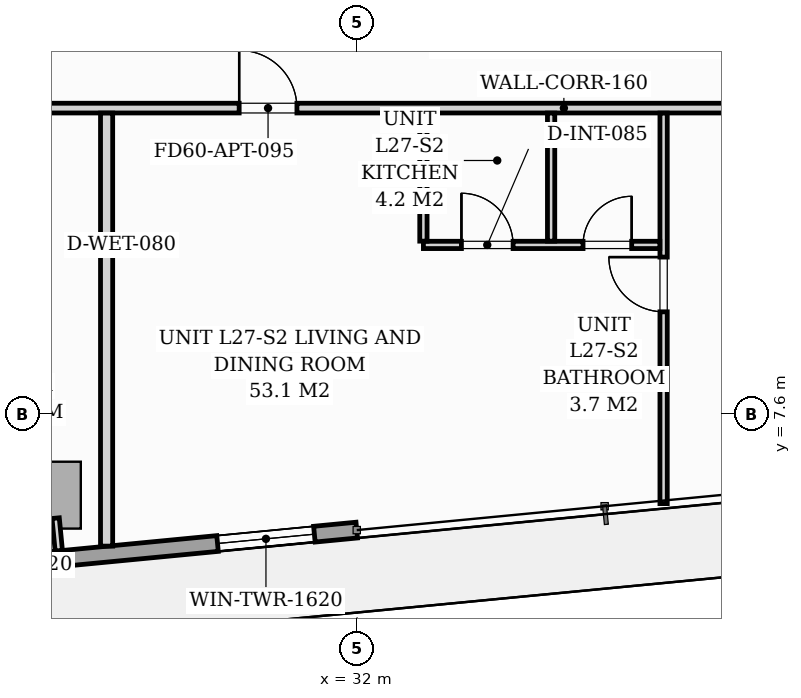
"""IFC4 building model, lengths in metres.
Left out: names, types, materials, properties, quantities, classifications, styles, units other than length and angle.
Written with IfcOpenShell. Run it as: python <this file> out.ifc"""

import sys

from ifc_helpers import new_model, si_unit, direction, frame, frame_2d, origin, origin_2d, place, context, subcontext, project, spatial, rectangle, extrude, source, transform, mapped, element, fill, save


model = new_model("IFC4")
c1 = context("Model", 3, precision=1e-05, world=origin(), true_north=direction((0.0, 1.0)))
c2 = subcontext(c1, "Body", "Model", "MODEL_VIEW")
j1 = project(units=[si_unit("LENGTHUNIT", "METRE"), si_unit("PLANEANGLEUNIT", "RADIAN")], contexts=[c1])
p1 = place(None, origin())
s1 = spatial("IfcSite", under=j1, at=p1, CompositionType="ELEMENT")
p2 = place(p1, origin())
s2 = spatial("IfcBuilding", under=s1, at=p2, CompositionType="ELEMENT")
p3 = place(p2, frame((0.0, 0.0, 97.0)))
s3 = spatial("IfcBuildingStorey", under=s2, at=p3, CompositionType="ELEMENT", Elevation=97.0)
m1 = source(origin(), c2, "Body", "SweptSolid", [
    extrude(rectangle(XDim=0.9, YDim=1.1, at=origin_2d()), origin(), (0.0, 0.0, 1.0), 3.196),
])
p4 = place(p3, frame((27.006, 6.265, 0.002), z_axis=(0.0, 0.0, 1.0), x_axis=(0.995396198367, 0.09584575252, 0.0)))
e1 = element("IfcColumn", 1, at=p4, inside=s3, PredefinedType="COLUMN", context=c2, shape_type="MappedRepresentation", body=[
    mapped(m1, transform((0.0, 0.0, 0.0), scale=1.0)),
])
p5 = place(p3, frame((31.994, 5.69, 0.0), z_axis=(0.0, 0.0, 1.0), x_axis=(-0.995396521236, -0.095842399342, 0.0)))
e2 = element("IfcWall", 2, at=p5, inside=s3, PredefinedType="STANDARD", context=c2, shape_type="SweptSolid", body=[
    extrude(rectangle(XDim=19.11, YDim=0.26, at=frame_2d((9.555, 0.0))), origin(), (0.0, 0.0, 1.0), 2.94),
])
p6 = place(p5, frame((7.91, 0.0, 0.0)))
e3 = element("IfcOpeningElement", 3, at=p6, cuts=e2, PredefinedType="OPENING", context=c2, shape_type="SweptSolid", body=[
    extrude(rectangle(XDim=1.8, YDim=2.06, at=frame_2d((0.9, 1.03))), frame((0.0, 0.14, 0.0), z_axis=(0.0, -1.0, 0.0), x_axis=(1.0, 0.0, 0.0)), (0.0, 0.0, 1.0), 0.28),
])
p7 = place(p5, frame((0.7, 0.0, 0.65)))
e4 = element("IfcOpeningElement", 4, at=p7, cuts=e2, PredefinedType="OPENING", context=c2, shape_type="SweptSolid", body=[
    extrude(rectangle(XDim=1.6, YDim=1.5, at=frame_2d((0.8, 0.75))), frame((0.0, 0.14, 0.0), z_axis=(0.0, -1.0, 0.0), x_axis=(1.0, 0.0, 0.0)), (0.0, 0.0, 1.0), 0.28),
])
p8 = place(p5, frame((5.167, 0.0, 0.75)))
e5 = element("IfcOpeningElement", 5, at=p8, cuts=e2, PredefinedType="OPENING", context=c2, shape_type="SweptSolid", body=[
    extrude(rectangle(XDim=1.6, YDim=1.5, at=frame_2d((0.8, 0.75))), frame((0.0, 0.14, 0.0), z_axis=(0.0, -1.0, 0.0), x_axis=(1.0, 0.0, 0.0)), (0.0, 0.0, 1.0), 0.28),
])
p9 = place(p3, frame((16.6, 12.63, 0.0), z_axis=(0.0, 0.0, 1.0), x_axis=(1.0, 0.0, 0.0)))
e6 = element("IfcWall", 6, at=p9, inside=s3, PredefinedType="PARTITIONING", context=c2, shape_type="SweptSolid", body=[
    extrude(rectangle(XDim=37.6, YDim=0.16, at=frame_2d((18.8, 0.0))), origin(), (0.0, 0.0, 1.0), 2.94),
])
p10 = place(p9, frame((1.626, 0.0, 0.0)))
e7 = element("IfcOpeningElement", 7, at=p10, cuts=e6, PredefinedType="OPENING", context=c2, shape_type="SweptSolid", body=[
    extrude(rectangle(XDim=0.95, YDim=2.06, at=frame_2d((0.475, 1.03))), frame((0.0, 0.09, 0.0), z_axis=(0.0, -1.0, 0.0), x_axis=(1.0, 0.0, 0.0)), (0.0, 0.0, 1.0), 0.18),
])
p11 = place(p9, frame((13.46, 0.0, 0.0)))
e8 = element("IfcOpeningElement", 8, at=p11, cuts=e6, PredefinedType="OPENING", context=c2, shape_type="SweptSolid", body=[
    extrude(rectangle(XDim=0.95, YDim=2.06, at=frame_2d((0.475, 1.03))), frame((0.0, 0.09, 0.0), z_axis=(0.0, -1.0, 0.0), x_axis=(1.0, 0.0, 0.0)), (0.0, 0.0, 1.0), 0.18),
])
p12 = place(p9, frame((26.522, 0.0, 0.0)))
e9 = element("IfcOpeningElement", 9, at=p12, cuts=e6, PredefinedType="OPENING", context=c2, shape_type="SweptSolid", body=[
    extrude(rectangle(XDim=0.95, YDim=2.06, at=frame_2d((0.475, 1.03))), frame((0.0, 0.09, 0.0), z_axis=(0.0, -1.0, 0.0), x_axis=(1.0, 0.0, 0.0)), (0.0, 0.0, 1.0), 0.18),
])
p13 = place(p3, frame((27.88, 5.427, 0.0), z_axis=(0.0, 0.0, 1.0), x_axis=(0.0, 1.0, 0.0)))
e10 = element("IfcWall", 10, at=p13, inside=s3, PredefinedType="PARTITIONING", context=c2, shape_type="SweptSolid", body=[
    extrude(rectangle(XDim=7.121, YDim=0.2, at=frame_2d((3.561, 0.0))), origin(), (0.0, 0.0, 1.0), 2.94),
])
p14 = place(p3, frame((37.04, 6.126, 0.0), z_axis=(0.0, 0.0, 1.0), x_axis=(0.0, 1.0, 0.0)))
e11 = element("IfcWall", 11, at=p14, inside=s3, PredefinedType="PARTITIONING", context=c2, shape_type="SweptSolid", body=[
    extrude(rectangle(XDim=6.422, YDim=0.12, at=frame_2d((3.211, 0.0))), origin(), (0.0, 0.0, 1.0), 2.94),
])
p15 = place(p14, frame((3.154, 0.0, 0.0)))
e12 = element("IfcOpeningElement", 12, at=p15, cuts=e11, PredefinedType="OPENING", context=c2, shape_type="SweptSolid", body=[
    extrude(rectangle(XDim=0.9, YDim=2.05, at=frame_2d((0.45, 1.025))), frame((0.0, 0.07, 0.0), z_axis=(0.0, -1.0, 0.0), x_axis=(1.0, 0.0, 0.0)), (0.0, 0.0, 1.0), 0.14),
])
p16 = place(p3, frame((33.09, 10.38, 0.0), z_axis=(0.0, 0.0, 1.0), x_axis=(1.0, 0.0, 0.0)))
e13 = element("IfcWall", 13, at=p16, inside=s3, PredefinedType="PARTITIONING", context=c2, shape_type="SweptSolid", body=[
    extrude(rectangle(XDim=3.888, YDim=0.12, at=frame_2d((1.944, 0.0))), origin(), (0.0, 0.0, 1.0), 2.94),
])
p17 = place(p16, frame((0.625, 0.0, 0.0)))
e14 = element("IfcOpeningElement", 14, at=p17, cuts=e13, PredefinedType="OPENING", context=c2, shape_type="SweptSolid", body=[
    extrude(rectangle(XDim=0.85, YDim=2.05, at=frame_2d((0.425, 1.025))), frame((0.0, 0.07, 0.0), z_axis=(0.0, -1.0, 0.0), x_axis=(1.0, 0.0, 0.0)), (0.0, 0.0, 1.0), 0.14),
])
p18 = place(p16, frame((2.625, 0.0, 0.0)))
e15 = element("IfcOpeningElement", 15, at=p18, cuts=e13, PredefinedType="OPENING", context=c2, shape_type="SweptSolid", body=[
    extrude(rectangle(XDim=0.8, YDim=2.02, at=frame_2d((0.4, 1.01))), frame((0.0, 0.07, 0.0), z_axis=(0.0, -1.0, 0.0), x_axis=(1.0, 0.0, 0.0)), (0.0, 0.0, 1.0), 0.14),
])
for number, where, z_axis, x_axis in (
    (16, (35.19, 10.442, 0.0), (0.0, 0.0, 1.0), (0.0, 1.0, 0.0)),
    (17, (33.09, 10.442, 0.0), (0.0, 0.0, 1.0), (0.0, 1.0, 0.0)),
):
    element("IfcWall", number, at=place(p3, frame(where, z_axis=z_axis, x_axis=x_axis)), inside=s3, PredefinedType="PARTITIONING", context=c2, shape_type="SweptSolid", body=[
        extrude(rectangle(XDim=2.106, YDim=0.12, at=frame_2d((1.053, 0.0))), origin(), (0.0, 0.0, 1.0), 2.94),
    ])
p19 = place(p3, frame((27.042, 5.887, 0.0), z_axis=(0.0, 0.0, 1.0), x_axis=(0.096222656154, -0.995359834654, 0.0)))
e18 = element("IfcWall", 18, at=p19, inside=s3, PredefinedType="PARTITIONING", context=c2, shape_type="SweptSolid", body=[
    extrude(rectangle(XDim=0.538, YDim=0.12, at=frame_2d((0.269, 0.0))), origin(), (0.0, 0.0, 1.0), 2.94),
])
m2 = source(origin(), c2, "Body", "SweptSolid", [
    extrude(rectangle(XDim=1.6, YDim=1.5, at=frame_2d((0.8, 0.75))), frame((0.0, 0.03, 0.0), z_axis=(0.0, -1.0, 0.0), x_axis=(1.0, 0.0, 0.0)), (0.0, 0.0, 1.0), 0.06),
])
p20 = place(p7, origin())
e19 = element("IfcWindow", 19, at=p20, inside=s3, PartitioningType="SINGLE_PANEL", PredefinedType="WINDOW", context=c2, shape_type="MappedRepresentation", body=[
    mapped(m2, transform((0.0, 0.0, 0.0), scale=1.0)),
])
fill(e4, e19)
m3 = source(origin(), c2, "Body", "SweptSolid", [
    extrude(rectangle(XDim=0.95, YDim=2.06, at=frame_2d((0.475, 1.03))), frame((0.0, 0.025, 0.0), z_axis=(0.0, -1.0, 0.0), x_axis=(1.0, 0.0, 0.0)), (0.0, 0.0, 1.0), 0.05),
])
p21 = place(p11, origin())
e20 = element("IfcDoor", 20, at=p21, inside=s3, OperationType="SINGLE_SWING_LEFT", PredefinedType="DOOR", context=c2, shape_type="MappedRepresentation", body=[
    mapped(m3, transform((0.0, 0.0, 0.0), scale=1.0)),
])
fill(e8, e20)
m4 = source(origin(), c2, "Body", "SweptSolid", [
    extrude(rectangle(XDim=0.9, YDim=2.05, at=frame_2d((0.45, 1.025))), frame((0.0, 0.025, 0.0), z_axis=(0.0, -1.0, 0.0), x_axis=(1.0, 0.0, 0.0)), (0.0, 0.0, 1.0), 0.05),
])
p22 = place(p15, origin())
e21 = element("IfcDoor", 21, at=p22, inside=s3, OperationType="SINGLE_SWING_RIGHT", PredefinedType="DOOR", context=c2, shape_type="MappedRepresentation", body=[
    mapped(m4, transform((0.0, 0.0, 0.0), scale=1.0)),
])
fill(e12, e21)
m5 = source(origin(), c2, "Body", "SweptSolid", [
    extrude(rectangle(XDim=0.85, YDim=2.05, at=frame_2d((0.425, 1.025))), frame((0.0, 0.025, 0.0), z_axis=(0.0, -1.0, 0.0), x_axis=(1.0, 0.0, 0.0)), (0.0, 0.0, 1.0), 0.05),
])
p23 = place(p17, origin())
e22 = element("IfcDoor", 22, at=p23, inside=s3, OperationType="SINGLE_SWING_LEFT", PredefinedType="DOOR", context=c2, shape_type="MappedRepresentation", body=[
    mapped(m5, transform((0.0, 0.0, 0.0), scale=1.0)),
])
fill(e14, e22)
m6 = source(origin(), c2, "Body", "SweptSolid", [
    extrude(rectangle(XDim=0.8, YDim=2.02, at=frame_2d((0.4, 1.01))), frame((0.0, 0.025, 0.0), z_axis=(0.0, -1.0, 0.0), x_axis=(1.0, 0.0, 0.0)), (0.0, 0.0, 1.0), 0.05),
])
p24 = place(p18, origin())
e23 = element("IfcDoor", 23, at=p24, inside=s3, OperationType="SINGLE_SWING_RIGHT", PredefinedType="DOOR", context=c2, shape_type="MappedRepresentation", body=[
    mapped(m6, transform((0.0, 0.0, 0.0), scale=1.0)),
])
fill(e15, e23)
save(model, sys.argv[1])
